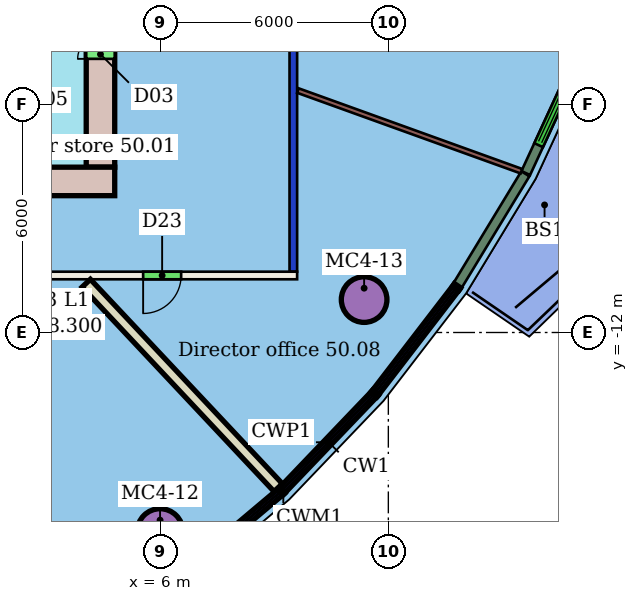
"""IFC4 building model, lengths in metres.
Left out: names, types, materials, properties, quantities, classifications, styles, units other than length and angle.
Written with IfcOpenShell. Run it as: python <this file> out.ifc"""

import sys

from ifc_helpers import new_model, si_unit, direction, frame, frame_2d, origin, origin_2d, place, context, subcontext, project, spatial, rectangle, hollow_circle, extrude, element, fill, save


model = new_model("IFC4")
c1 = context("Model", 3, precision=1e-05, world=origin(), true_north=direction((0.0, 1.0)))
c2 = subcontext(c1, "Body", "Model", "MODEL_VIEW")
j1 = project(units=[si_unit("LENGTHUNIT", "METRE"), si_unit("PLANEANGLEUNIT", "RADIAN")], contexts=[c1])
p1 = place(None, origin())
s1 = spatial("IfcSite", under=j1, at=p1, CompositionType="ELEMENT")
p2 = place(p1, origin())
s2 = spatial("IfcBuilding", under=s1, at=p2, CompositionType="ELEMENT")
p3 = place(p2, frame((0.0, 0.0, 206.5)))
s3 = spatial("IfcBuildingStorey", under=s2, at=p3, CompositionType="ELEMENT", Elevation=206.5)
for number, where, z_axis, x_axis in (
    (1, (5.993, -17.237, 0.0), (0.0, 0.0, 1.0), (1.0, 0.0, 0.0)),
    (2, (11.363, -11.134, 0.0), (0.0, 0.0, 1.0), (1.0, 0.0, 0.0)),
):
    element("IfcColumn", number, at=place(p3, frame(where, z_axis=z_axis, x_axis=x_axis)), inside=s3, PredefinedType="COLUMN", context=c2, shape_type="SweptSolid", body=[
        extrude(hollow_circle(Radius=0.6, WallThickness=0.045, at=origin_2d()), origin(), (0.0, 0.0, 1.0), 3.45),
    ])
p4 = place(p3, frame((9.6, -10.5, 0.0), z_axis=(0.0, 0.0, 1.0), x_axis=(-1.0, 0.0, 0.0)))
e3 = element("IfcWall", 3, at=p4, inside=s3, PredefinedType="PARTITIONING", context=c2, shape_type="SweptSolid", body=[
    extrude(rectangle(XDim=31.2, YDim=0.2, at=frame_2d((15.6, 0.0))), origin(), (0.0, 0.0, 1.0), 3.45),
])
p5 = place(p4, frame((22.21, 0.0, 0.0)))
e4 = element("IfcOpeningElement", 4, at=p5, cuts=e3, PredefinedType="OPENING", context=c2, shape_type="SweptSolid", body=[
    extrude(rectangle(XDim=0.9, YDim=2.1, at=frame_2d((0.45, 1.05))), frame((0.0, 0.11, 0.0), z_axis=(0.0, -1.0, 0.0), x_axis=(1.0, 0.0, 0.0)), (0.0, 0.0, 1.0), 0.22),
])
p6 = place(p4, frame((19.173, 0.0, 0.0)))
e5 = element("IfcOpeningElement", 5, at=p6, cuts=e3, PredefinedType="OPENING", context=c2, shape_type="SweptSolid", body=[
    extrude(rectangle(XDim=0.9, YDim=2.1, at=frame_2d((0.45, 1.05))), frame((0.0, 0.11, 0.0), z_axis=(0.0, -1.0, 0.0), x_axis=(1.0, 0.0, 0.0)), (0.0, 0.0, 1.0), 0.22),
])
p7 = place(p4, frame((8.72, 0.0, 0.0)))
e6 = element("IfcOpeningElement", 6, at=p7, cuts=e3, PredefinedType="OPENING", context=c2, shape_type="SweptSolid", body=[
    extrude(rectangle(XDim=1.8, YDim=2.4, at=frame_2d((0.9, 1.2))), frame((0.0, 0.11, 0.0), z_axis=(0.0, -1.0, 0.0), x_axis=(1.0, 0.0, 0.0)), (0.0, 0.0, 1.0), 0.22),
])
p8 = place(p4, frame((3.052, 0.0, 0.0)))
e7 = element("IfcOpeningElement", 7, at=p8, cuts=e3, PredefinedType="OPENING", context=c2, shape_type="SweptSolid", body=[
    extrude(rectangle(XDim=1.0, YDim=2.4, at=frame_2d((0.5, 1.2))), frame((0.0, 0.11, 0.0), z_axis=(0.0, -1.0, 0.0), x_axis=(1.0, 0.0, 0.0)), (0.0, 0.0, 1.0), 0.22),
])
p9 = place(p3, frame((9.5, 10.4, 0.0), z_axis=(0.0, 0.0, 1.0), x_axis=(0.0, -1.0, 0.0)))
e8 = element("IfcWall", 8, at=p9, inside=s3, PredefinedType="PARTITIONING", context=c2, shape_type="SweptSolid", body=[
    extrude(rectangle(XDim=20.8, YDim=0.2, at=frame_2d((10.4, 0.0))), origin(), (0.0, 0.0, 1.0), 3.05),
])
p10 = place(p9, frame((8.246, 0.0, 0.0)))
e9 = element("IfcOpeningElement", 9, at=p10, cuts=e8, PredefinedType="OPENING", context=c2, shape_type="SweptSolid", body=[
    extrude(rectangle(XDim=1.5, YDim=2.1, at=frame_2d((0.75, 1.05))), frame((0.0, 0.11, 0.0), z_axis=(0.0, -1.0, 0.0), x_axis=(1.0, 0.0, 0.0)), (0.0, 0.0, 1.0), 0.22),
])
p11 = place(p3, frame((9.102, -16.082, 0.0), z_axis=(0.0, 0.0, 1.0), x_axis=(-0.684541774507, 0.728973633923, 0.0)))
e10 = element("IfcWall", 10, at=p11, inside=s3, PredefinedType="PARTITIONING", context=c2, shape_type="SweptSolid", body=[
    extrude(rectangle(XDim=7.379, YDim=0.3, at=frame_2d((3.69, 0.0))), origin(), (0.0, 0.0, 1.0), 3.45),
])
p12 = place(p3, frame((15.501, -7.756, 0.0), z_axis=(0.0, 0.0, 1.0), x_axis=(-0.940683105583, 0.339286449583, 0.0)))
e11 = element("IfcWall", 11, at=p12, inside=s3, PredefinedType="PARTITIONING", context=c2, shape_type="SweptSolid", body=[
    extrude(rectangle(XDim=6.251, YDim=0.125, at=frame_2d((3.125, 0.0))), origin(), (0.0, 0.0, 1.0), 3.45),
])
p13 = place(p3, frame((13.827, -10.755, 0.0), z_axis=(0.0, 0.0, 1.0), x_axis=(0.518887081606, 0.854842790542, 0.0)))
e12 = element("IfcWall", 12, at=p13, inside=s3, PredefinedType="SOLIDWALL", context=c2, shape_type="SweptSolid", body=[
    extrude(rectangle(XDim=3.429, YDim=0.25, at=frame_2d((1.714, 0.0))), origin(), (0.0, 0.0, 1.0), 3.1),
])
p14 = place(p3, frame((15.616, -7.804, 0.0), z_axis=(0.0, 0.0, 1.0), x_axis=(0.419438897157, 0.907783570876, 0.0)))
e13 = element("IfcWall", 13, at=p14, inside=s3, PredefinedType="SOLIDWALL", context=c2, shape_type="SweptSolid", body=[
    extrude(rectangle(XDim=3.416, YDim=0.25, at=frame_2d((1.708, 0.0))), origin(), (0.0, 0.0, 1.0), 3.1),
])
p15 = place(p14, frame((0.808, 0.0, 0.0)))
e14 = element("IfcOpeningElement", 14, at=p15, cuts=e13, PredefinedType="OPENING", context=c2, shape_type="SweptSolid", body=[
    extrude(rectangle(XDim=1.8, YDim=2.4, at=frame_2d((0.9, 1.2))), frame((0.0, 0.135, 0.0), z_axis=(0.0, -1.0, 0.0), x_axis=(1.0, 0.0, 0.0)), (0.0, 0.0, 1.0), 0.27),
])
p16 = place(p3, frame((-16.8, -8.025, 0.0), z_axis=(0.0, 0.0, 1.0), x_axis=(1.0, 0.0, 0.0)))
e15 = element("IfcWall", 15, at=p16, inside=s3, PredefinedType="SHEAR", context=c2, shape_type="SweptSolid", body=[
    extrude(rectangle(XDim=21.6, YDim=0.75, at=frame_2d((10.8, 0.0))), origin(), (0.0, 0.0, 1.0), 3.3),
])
p17 = place(p16, frame((4.8, 0.0, 0.0)))
e16 = element("IfcOpeningElement", 16, at=p17, cuts=e15, PredefinedType="OPENING", context=c2, shape_type="SweptSolid", body=[
    extrude(rectangle(XDim=1.2, YDim=2.1, at=frame_2d((0.6, 1.05))), frame((0.0, 0.385, 0.0), z_axis=(0.0, -1.0, 0.0), x_axis=(1.0, 0.0, 0.0)), (0.0, 0.0, 1.0), 0.77),
])
p18 = place(p3, frame((4.425, -7.65, 0.0), z_axis=(0.0, 0.0, 1.0), x_axis=(0.0, 1.0, 0.0)))
e17 = element("IfcWall", 17, at=p18, inside=s3, PredefinedType="SHEAR", context=c2, shape_type="SweptSolid", body=[
    extrude(rectangle(XDim=15.3, YDim=0.75, at=frame_2d((7.65, 0.0))), origin(), (0.0, 0.0, 1.0), 3.3),
])
p19 = place(p18, frame((2.85, 0.0, 0.0)))
e18 = element("IfcOpeningElement", 18, at=p19, cuts=e17, PredefinedType="OPENING", context=c2, shape_type="SweptSolid", body=[
    extrude(rectangle(XDim=1.2, YDim=2.1, at=frame_2d((0.6, 1.05))), frame((0.0, 0.385, 0.0), z_axis=(0.0, -1.0, 0.0), x_axis=(1.0, 0.0, 0.0)), (0.0, 0.0, 1.0), 0.77),
])
p20 = place(p18, frame((11.25, 0.0, 0.0)))
e19 = element("IfcOpeningElement", 19, at=p20, cuts=e17, PredefinedType="OPENING", context=c2, shape_type="SweptSolid", body=[
    extrude(rectangle(XDim=1.2, YDim=2.1, at=frame_2d((0.6, 1.05))), frame((0.0, 0.385, 0.0), z_axis=(0.0, -1.0, 0.0), x_axis=(1.0, 0.0, 0.0)), (0.0, 0.0, 1.0), 0.77),
])
p21 = place(p8, origin())
e20 = element("IfcDoor", 20, at=p21, inside=s3, OperationType="SINGLE_SWING_RIGHT", PredefinedType="DOOR", context=c2, shape_type="SweptSolid", body=[
    extrude(rectangle(XDim=1.0, YDim=2.4, at=frame_2d((0.5, 1.2))), frame((0.0, 0.025, 0.0), z_axis=(0.0, -1.0, 0.0), x_axis=(1.0, 0.0, 0.0)), (0.0, 0.0, 1.0), 0.05),
])
fill(e7, e20)
p22 = place(p15, origin())
e21 = element("IfcDoor", 21, at=p22, inside=s3, OperationType="DOUBLE_DOOR_SLIDING", PredefinedType="DOOR", context=c2, shape_type="SweptSolid", body=[
    extrude(rectangle(XDim=1.8, YDim=2.4, at=frame_2d((0.9, 1.2))), frame((0.0, 0.025, 0.0), z_axis=(0.0, -1.0, 0.0), x_axis=(1.0, 0.0, 0.0)), (0.0, 0.0, 1.0), 0.05),
])
fill(e14, e21)
p23 = place(p19, origin())
e22 = element("IfcDoor", 22, at=p23, inside=s3, OperationType="DOUBLE_DOOR_SINGLE_SWING", PredefinedType="NOTDEFINED", context=c2, shape_type="SweptSolid", body=[
    extrude(rectangle(XDim=1.2, YDim=2.1, at=frame_2d((0.6, 1.05))), frame((0.0, 0.025, 0.0), z_axis=(0.0, -1.0, 0.0), x_axis=(1.0, 0.0, 0.0)), (0.0, 0.0, 1.0), 0.05),
])
fill(e18, e22)
save(model, sys.argv[1])
